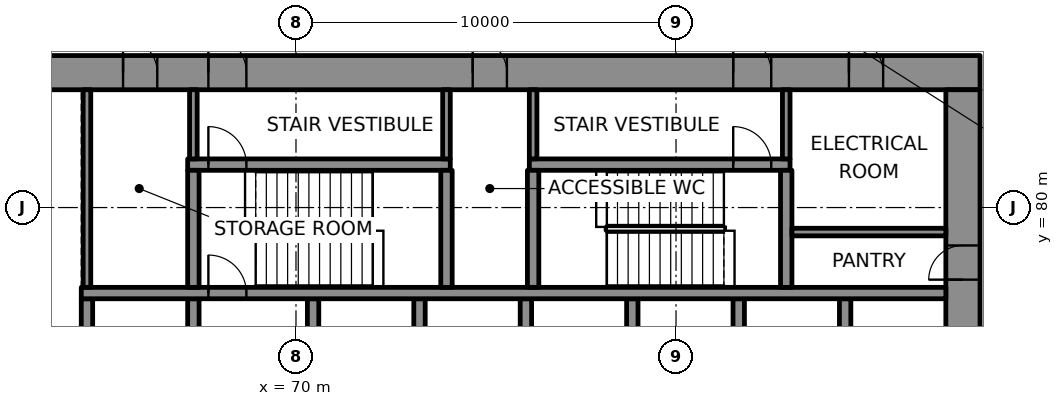
"""IFC4 building model, lengths in metres.
Left out: names, types, materials, properties, quantities, classifications, styles, units other than length and angle.
Written with IfcOpenShell. Run it as: python <this file> out.ifc"""

import sys

from ifc_helpers import new_model, si_unit, direction, frame, frame_2d, origin, place, context, subcontext, project, spatial, rectangle, extrude, element, fill, save


model = new_model("IFC4")
c1 = context("Model", 3, precision=1e-05, world=origin(), true_north=direction((0.0, 1.0)))
c2 = subcontext(c1, "Body", "Model", "MODEL_VIEW")
j1 = project(units=[si_unit("LENGTHUNIT", "METRE"), si_unit("PLANEANGLEUNIT", "RADIAN")], contexts=[c1])
p1 = place(None, origin())
s1 = spatial("IfcSite", under=j1, at=p1, CompositionType="ELEMENT")
p2 = place(p1, origin())
s2 = spatial("IfcBuilding", under=s1, at=p2, CompositionType="ELEMENT")
p3 = place(p2, frame((0.0, 0.0, 73.6)))
s3 = spatial("IfcBuildingStorey", under=s2, at=p3, CompositionType="ELEMENT", Elevation=73.6)
p4 = place(p3, frame((62.0, 83.55, 0.0), z_axis=(0.0, 0.0, 1.0), x_axis=(1.0, 0.0, 0.0)))
e1 = element("IfcWall", 1, at=p4, inside=s3, PredefinedType="SHEAR", context=c2, shape_type="SweptSolid", body=[
    extrude(rectangle(XDim=26.0, YDim=0.9, at=frame_2d((13.0, 0.0))), origin(), (0.0, 0.0, 1.0), 4.0),
])
p5 = place(p4, frame((5.695, 0.0, 0.0)))
e2 = element("IfcOpeningElement", 2, at=p5, cuts=e1, PredefinedType="OPENING", context=c2, shape_type="SweptSolid", body=[
    extrude(rectangle(XDim=1.0, YDim=2.1, at=frame_2d((0.5, 1.05))), frame((0.0, 0.46, 0.0), z_axis=(0.0, -1.0, 0.0), x_axis=(1.0, 0.0, 0.0)), (0.0, 0.0, 1.0), 0.92),
])
p6 = place(p4, frame((19.505, 0.0, 0.0)))
e3 = element("IfcOpeningElement", 3, at=p6, cuts=e1, PredefinedType="OPENING", context=c2, shape_type="SweptSolid", body=[
    extrude(rectangle(XDim=1.0, YDim=2.1, at=frame_2d((0.5, 1.05))), frame((0.0, 0.46, 0.0), z_axis=(0.0, -1.0, 0.0), x_axis=(1.0, 0.0, 0.0)), (0.0, 0.0, 1.0), 0.92),
])
p7 = place(p4, frame((3.45, 0.0, 0.0)))
e4 = element("IfcOpeningElement", 4, at=p7, cuts=e1, PredefinedType="OPENING", context=c2, shape_type="SweptSolid", body=[
    extrude(rectangle(XDim=0.9, YDim=2.1, at=frame_2d((0.45, 1.05))), frame((0.0, 0.46, 0.0), z_axis=(0.0, -1.0, 0.0), x_axis=(1.0, 0.0, 0.0)), (0.0, 0.0, 1.0), 0.92),
])
p8 = place(p4, frame((12.65, 0.0, 0.0)))
e5 = element("IfcOpeningElement", 5, at=p8, cuts=e1, PredefinedType="OPENING", context=c2, shape_type="SweptSolid", body=[
    extrude(rectangle(XDim=0.9, YDim=2.1, at=frame_2d((0.45, 1.05))), frame((0.0, 0.46, 0.0), z_axis=(0.0, -1.0, 0.0), x_axis=(1.0, 0.0, 0.0)), (0.0, 0.0, 1.0), 0.92),
])
p9 = place(p4, frame((22.55, 0.0, 0.0)))
e6 = element("IfcOpeningElement", 6, at=p9, cuts=e1, PredefinedType="OPENING", context=c2, shape_type="SweptSolid", body=[
    extrude(rectangle(XDim=0.9, YDim=2.1, at=frame_2d((0.45, 1.05))), frame((0.0, 0.46, 0.0), z_axis=(0.0, -1.0, 0.0), x_axis=(1.0, 0.0, 0.0)), (0.0, 0.0, 1.0), 0.92),
])
p10 = place(p3, frame((87.55, 66.9, 0.0), z_axis=(0.0, 0.0, 1.0), x_axis=(0.0, 1.0, 0.0)))
e7 = element("IfcWall", 7, at=p10, inside=s3, PredefinedType="SHEAR", context=c2, shape_type="SweptSolid", body=[
    extrude(rectangle(XDim=16.2, YDim=0.9, at=frame_2d((8.1, 0.0))), origin(), (0.0, 0.0, 1.0), 4.0),
])
p11 = place(p10, frame((5.5, 0.0, 0.0)))
e8 = element("IfcOpeningElement", 8, at=p11, cuts=e7, PredefinedType="OPENING", context=c2, shape_type="SweptSolid", body=[
    extrude(rectangle(XDim=1.8, YDim=2.1, at=frame_2d((0.9, 1.05))), frame((0.0, 0.46, 0.0), z_axis=(0.0, -1.0, 0.0), x_axis=(1.0, 0.0, 0.0)), (0.0, 0.0, 1.0), 0.92),
])
p12 = place(p10, frame((11.202, 0.0, 0.0)))
e9 = element("IfcOpeningElement", 9, at=p12, cuts=e7, PredefinedType="OPENING", context=c2, shape_type="SweptSolid", body=[
    extrude(rectangle(XDim=0.9, YDim=2.1, at=frame_2d((0.45, 1.05))), frame((0.0, 0.46, 0.0), z_axis=(0.0, -1.0, 0.0), x_axis=(1.0, 0.0, 0.0)), (0.0, 0.0, 1.0), 0.92),
])
for number, where, z_axis, x_axis in (
    (10, (64.5, 75.0, 0.0), (0.0, 0.0, 1.0), (0.0, 1.0, 0.0)),
    (11, (67.3, 75.0, 0.0), (0.0, 0.0, 1.0), (0.0, 1.0, 0.0)),
):
    element("IfcWall", number, at=place(p3, frame(where, z_axis=z_axis, x_axis=x_axis)), inside=s3, PredefinedType="SHEAR", context=c2, shape_type="SweptSolid", body=[
        extrude(rectangle(XDim=2.6, YDim=0.3, at=frame_2d((1.3, 0.0))), origin(), (0.0, 0.0, 1.0), 4.0),
    ])
p13 = place(p3, frame((70.45, 75.0, 0.0), z_axis=(0.0, 0.0, 1.0), x_axis=(0.0, 1.0, 0.0)))
e12 = element("IfcWall", 12, at=p13, inside=s3, PredefinedType="SHEAR", context=c2, shape_type="SweptSolid", body=[
    extrude(rectangle(XDim=2.6, YDim=0.3, at=frame_2d((1.3, 0.0))), origin(), (0.0, 0.0, 1.0), 4.0),
])
p14 = place(p13, frame((0.15, 0.0, 0.0)))
e13 = element("IfcOpeningElement", 13, at=p14, cuts=e12, PredefinedType="OPENING", context=c2, shape_type="SweptSolid", body=[
    extrude(rectangle(XDim=1.1, YDim=2.1, at=frame_2d((0.55, 1.05))), frame((0.0, 0.16, 0.0), z_axis=(0.0, -1.0, 0.0), x_axis=(1.0, 0.0, 0.0)), (0.0, 0.0, 1.0), 0.32),
])
for number, where, z_axis, x_axis in (
    (14, (73.25, 75.0, 0.0), (0.0, 0.0, 1.0), (0.0, 1.0, 0.0)),
    (15, (76.05, 75.0, 0.0), (0.0, 0.0, 1.0), (0.0, 1.0, 0.0)),
    (16, (78.85, 75.0, 0.0), (0.0, 0.0, 1.0), (0.0, 1.0, 0.0)),
    (17, (81.65, 75.0, 0.0), (0.0, 0.0, 1.0), (0.0, 1.0, 0.0)),
    (18, (84.45, 75.0, 0.0), (0.0, 0.0, 1.0), (0.0, 1.0, 0.0)),
):
    element("IfcWall", number, at=place(p3, frame(where, z_axis=z_axis, x_axis=x_axis)), inside=s3, PredefinedType="SHEAR", context=c2, shape_type="SweptSolid", body=[
        extrude(rectangle(XDim=2.6, YDim=0.3, at=frame_2d((1.3, 0.0))), origin(), (0.0, 0.0, 1.0), 4.0),
    ])
p15 = place(p3, frame((64.35, 77.75, 0.0), z_axis=(0.0, 0.0, 1.0), x_axis=(1.0, 0.0, 0.0)))
e19 = element("IfcWall", 19, at=p15, inside=s3, PredefinedType="SHEAR", context=c2, shape_type="SweptSolid", body=[
    extrude(rectangle(XDim=22.75, YDim=0.3, at=frame_2d((11.375, 0.0))), origin(), (0.0, 0.0, 1.0), 4.0),
])
p16 = place(p15, frame((3.345, 0.0, 0.0)))
e20 = element("IfcOpeningElement", 20, at=p16, cuts=e19, PredefinedType="OPENING", context=c2, shape_type="SweptSolid", body=[
    extrude(rectangle(XDim=1.0, YDim=2.1, at=frame_2d((0.5, 1.05))), frame((0.0, 0.16, 0.0), z_axis=(0.0, -1.0, 0.0), x_axis=(1.0, 0.0, 0.0)), (0.0, 0.0, 1.0), 0.32),
])
p17 = place(p3, frame((67.15, 81.13, 0.0), z_axis=(0.0, 0.0, 1.0), x_axis=(1.0, 0.0, 0.0)))
e21 = element("IfcWall", 21, at=p17, inside=s3, PredefinedType="SHEAR", context=c2, shape_type="SweptSolid", body=[
    extrude(rectangle(XDim=6.91, YDim=0.3, at=frame_2d((3.455, 0.0))), origin(), (0.0, 0.0, 1.0), 4.0),
])
p18 = place(p17, frame((0.545, 0.0, 0.0)))
e22 = element("IfcOpeningElement", 22, at=p18, cuts=e21, PredefinedType="OPENING", context=c2, shape_type="SweptSolid", body=[
    extrude(rectangle(XDim=1.0, YDim=2.1, at=frame_2d((0.5, 1.05))), frame((0.0, 0.16, 0.0), z_axis=(0.0, -1.0, 0.0), x_axis=(1.0, 0.0, 0.0)), (0.0, 0.0, 1.0), 0.32),
])
p19 = place(p3, frame((76.14, 81.13, 0.0), z_axis=(0.0, 0.0, 1.0), x_axis=(1.0, 0.0, 0.0)))
e23 = element("IfcWall", 23, at=p19, inside=s3, PredefinedType="SHEAR", context=c2, shape_type="SweptSolid", body=[
    extrude(rectangle(XDim=6.86, YDim=0.3, at=frame_2d((3.43, 0.0))), origin(), (0.0, 0.0, 1.0), 4.0),
])
p20 = place(p19, frame((5.365, 0.0, 0.0)))
e24 = element("IfcOpeningElement", 24, at=p20, cuts=e23, PredefinedType="OPENING", context=c2, shape_type="SweptSolid", body=[
    extrude(rectangle(XDim=1.0, YDim=2.1, at=frame_2d((0.5, 1.05))), frame((0.0, 0.16, 0.0), z_axis=(0.0, -1.0, 0.0), x_axis=(1.0, 0.0, 0.0)), (0.0, 0.0, 1.0), 0.32),
])
for number, where, z_axis, x_axis in (
    (25, (67.3, 77.9, 0.0), (0.0, 0.0, 1.0), (0.0, 1.0, 0.0)),
    (26, (73.96, 77.9, 0.0), (0.0, 0.0, 1.0), (0.0, 1.0, 0.0)),
    (27, (76.24, 77.9, 0.0), (0.0, 0.0, 1.0), (0.0, 1.0, 0.0)),
    (28, (82.9, 77.9, 0.0), (0.0, 0.0, 1.0), (0.0, 1.0, 0.0)),
):
    element("IfcWall", number, at=place(p3, frame(where, z_axis=z_axis, x_axis=x_axis)), inside=s3, PredefinedType="SHEAR", context=c2, shape_type="SweptSolid", body=[
        extrude(rectangle(XDim=3.08, YDim=0.3, at=frame_2d((1.54, 0.0))), origin(), (0.0, 0.0, 1.0), 4.0),
    ])
p21 = place(p3, frame((83.05, 79.355, 0.0), z_axis=(0.0, 0.0, 1.0), x_axis=(1.0, 0.0, 0.0)))
e29 = element("IfcWall", 29, at=p21, inside=s3, PredefinedType="PARTITIONING", context=c2, shape_type="SweptSolid", body=[
    extrude(rectangle(XDim=4.05, YDim=0.2, at=frame_2d((2.025, 0.0))), origin(), (0.0, 0.0, 1.0), 4.0),
])
p22 = place(p3, frame((64.5, 77.9, 0.0), z_axis=(0.0, 0.0, 1.0), x_axis=(0.0, 1.0, 0.0)))
e30 = element("IfcWall", 30, at=p22, inside=s3, PredefinedType="PARTITIONING", context=c2, shape_type="SweptSolid", body=[
    extrude(rectangle(XDim=5.2, YDim=0.2, at=frame_2d((2.6, 0.0))), origin(), (0.0, 0.0, 1.0), 4.0),
])
for number, where, z_axis, x_axis in (
    (31, (67.3, 81.28, 0.0), (0.0, 0.0, 1.0), (0.0, 1.0, 0.0)),
    (32, (73.96, 81.28, 0.0), (0.0, 0.0, 1.0), (0.0, 1.0, 0.0)),
    (33, (76.24, 81.28, 0.0), (0.0, 0.0, 1.0), (0.0, 1.0, 0.0)),
    (34, (82.9, 81.28, 0.0), (0.0, 0.0, 1.0), (0.0, 1.0, 0.0)),
):
    element("IfcWall", number, at=place(p3, frame(where, z_axis=z_axis, x_axis=x_axis)), inside=s3, PredefinedType="PARTITIONING", context=c2, shape_type="SweptSolid", body=[
        extrude(rectangle(XDim=1.82, YDim=0.2, at=frame_2d((0.91, 0.0))), origin(), (0.0, 0.0, 1.0), 4.0),
    ])
p23 = place(p16, origin())
e35 = element("IfcDoor", 35, at=p23, inside=s3, OperationType="SINGLE_SWING_LEFT", PredefinedType="DOOR", context=c2, shape_type="SweptSolid", body=[
    extrude(rectangle(XDim=1.0, YDim=2.1, at=frame_2d((0.5, 1.05))), frame((0.0, 0.025, 0.0), z_axis=(0.0, -1.0, 0.0), x_axis=(1.0, 0.0, 0.0)), (0.0, 0.0, 1.0), 0.05),
])
fill(e20, e35)
p24 = place(p18, origin())
e36 = element("IfcDoor", 36, at=p24, inside=s3, OperationType="SINGLE_SWING_RIGHT", PredefinedType="DOOR", context=c2, shape_type="SweptSolid", body=[
    extrude(rectangle(XDim=1.0, YDim=2.1, at=frame_2d((0.5, 1.05))), frame((0.0, 0.025, 0.0), z_axis=(0.0, -1.0, 0.0), x_axis=(1.0, 0.0, 0.0)), (0.0, 0.0, 1.0), 0.05),
])
fill(e22, e36)
p25 = place(p5, origin())
e37 = element("IfcDoor", 37, at=p25, inside=s3, OperationType="SINGLE_SWING_LEFT", PredefinedType="DOOR", context=c2, shape_type="SweptSolid", body=[
    extrude(rectangle(XDim=1.0, YDim=2.1, at=frame_2d((0.5, 1.05))), frame((0.0, 0.17, 0.0), z_axis=(0.0, -1.0, 0.0), x_axis=(1.0, 0.0, 0.0)), (0.0, 0.0, 1.0), 0.34),
])
fill(e2, e37)
p26 = place(p20, origin())
e38 = element("IfcDoor", 38, at=p26, inside=s3, OperationType="SINGLE_SWING_RIGHT", PredefinedType="DOOR", context=c2, shape_type="SweptSolid", body=[
    extrude(rectangle(XDim=1.0, YDim=2.1, at=frame_2d((0.5, 1.05))), frame((0.0, 0.025, 0.0), z_axis=(0.0, -1.0, 0.0), x_axis=(1.0, 0.0, 0.0)), (0.0, 0.0, 1.0), 0.05),
])
fill(e24, e38)
p27 = place(p6, origin())
e39 = element("IfcDoor", 39, at=p27, inside=s3, OperationType="SINGLE_SWING_LEFT", PredefinedType="DOOR", context=c2, shape_type="SweptSolid", body=[
    extrude(rectangle(XDim=1.0, YDim=2.1, at=frame_2d((0.5, 1.05))), frame((0.0, 0.17, 0.0), z_axis=(0.0, -1.0, 0.0), x_axis=(1.0, 0.0, 0.0)), (0.0, 0.0, 1.0), 0.34),
])
fill(e3, e39)
p28 = place(p7, origin())
e40 = element("IfcDoor", 40, at=p28, inside=s3, OperationType="SINGLE_SWING_RIGHT", PredefinedType="DOOR", context=c2, shape_type="SweptSolid", body=[
    extrude(rectangle(XDim=0.9, YDim=2.1, at=frame_2d((0.45, 1.05))), frame((0.0, 0.17, 0.0), z_axis=(0.0, -1.0, 0.0), x_axis=(1.0, 0.0, 0.0)), (0.0, 0.0, 1.0), 0.34),
])
fill(e4, e40)
p29 = place(p8, origin())
e41 = element("IfcDoor", 41, at=p29, inside=s3, OperationType="SINGLE_SWING_LEFT", PredefinedType="DOOR", context=c2, shape_type="SweptSolid", body=[
    extrude(rectangle(XDim=0.9, YDim=2.1, at=frame_2d((0.45, 1.05))), frame((0.0, 0.17, 0.0), z_axis=(0.0, -1.0, 0.0), x_axis=(1.0, 0.0, 0.0)), (0.0, 0.0, 1.0), 0.34),
])
fill(e5, e41)
p30 = place(p12, origin())
e42 = element("IfcDoor", 42, at=p30, inside=s3, OperationType="SINGLE_SWING_RIGHT", PredefinedType="DOOR", context=c2, shape_type="SweptSolid", body=[
    extrude(rectangle(XDim=0.9, YDim=2.1, at=frame_2d((0.45, 1.05))), frame((0.0, 0.17, 0.0), z_axis=(0.0, -1.0, 0.0), x_axis=(1.0, 0.0, 0.0)), (0.0, 0.0, 1.0), 0.34),
])
fill(e9, e42)
p31 = place(p9, origin())
e43 = element("IfcDoor", 43, at=p31, inside=s3, OperationType="SINGLE_SWING_LEFT", PredefinedType="DOOR", context=c2, shape_type="SweptSolid", body=[
    extrude(rectangle(XDim=0.9, YDim=2.1, at=frame_2d((0.45, 1.05))), frame((0.0, 0.17, 0.0), z_axis=(0.0, -1.0, 0.0), x_axis=(1.0, 0.0, 0.0)), (0.0, 0.0, 1.0), 0.34),
])
fill(e6, e43)
save(model, sys.argv[1])
